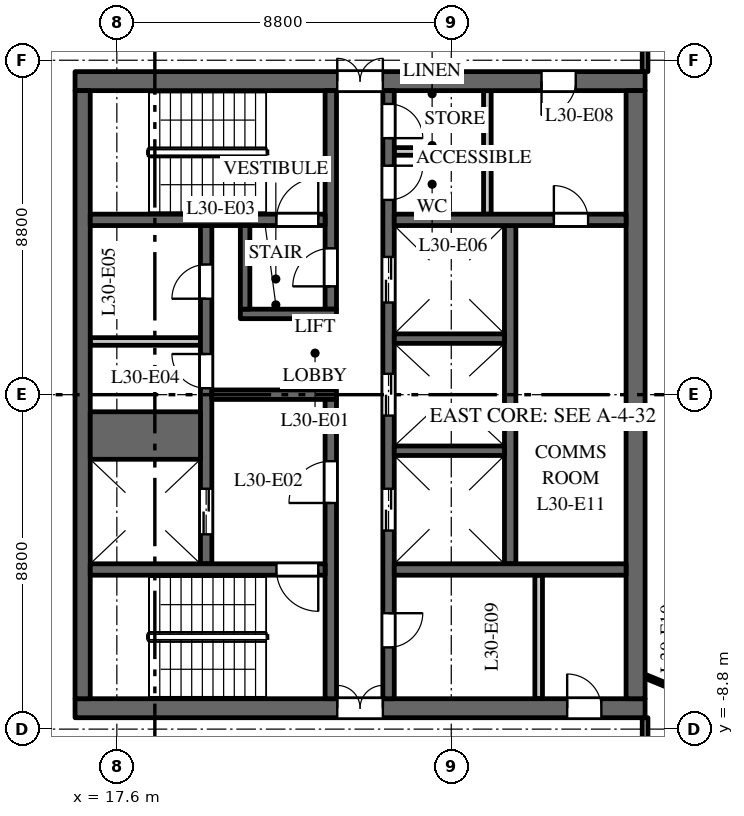
"""IFC4 building model, lengths in metres.
Left out: names, types, materials, properties, quantities, classifications, styles, units other than length and angle.
Written with IfcOpenShell. Run it as: python <this file> out.ifc"""

import sys

from ifc_helpers import new_model, si_unit, direction, frame, frame_2d, origin, place, context, subcontext, project, spatial, rectangle, extrude, element, fill, save


model = new_model("IFC4")
c1 = context("Model", 3, precision=1e-05, world=origin(), true_north=direction((0.0, 1.0)))
c2 = subcontext(c1, "Body", "Model", "MODEL_VIEW")
j1 = project(units=[si_unit("LENGTHUNIT", "METRE"), si_unit("PLANEANGLEUNIT", "RADIAN")], contexts=[c1])
p1 = place(None, origin())
s1 = spatial("IfcSite", under=j1, at=p1, CompositionType="ELEMENT")
p2 = place(p1, origin())
s2 = spatial("IfcBuilding", under=s1, at=p2, CompositionType="ELEMENT")
p3 = place(p2, frame((0.0, 0.0, 132.0)))
s3 = spatial("IfcBuildingStorey", under=s2, at=p3, CompositionType="ELEMENT", Elevation=132.0)
p4 = place(p3, frame((16.5, 8.25, 0.0), z_axis=(0.0, 0.0, 1.0), x_axis=(1.0, 0.0, 0.0)))
e1 = element("IfcWall", 1, at=p4, inside=s3, PredefinedType="SHEAR", context=c2, shape_type="SweptSolid", body=[
    extrude(rectangle(XDim=15.0, YDim=0.5, at=frame_2d((7.5, 0.0))), origin(), (0.0, 0.0, 1.0), 3.7),
])
p5 = place(p4, frame((6.9, 0.0, 0.0)))
e2 = element("IfcOpeningElement", 2, at=p5, cuts=e1, PredefinedType="OPENING", context=c2, shape_type="SweptSolid", body=[
    extrude(rectangle(XDim=1.2, YDim=2.1, at=frame_2d((0.6, 1.05))), frame((0.0, 0.26, 0.0), z_axis=(0.0, -1.0, 0.0), x_axis=(1.0, 0.0, 0.0)), (0.0, 0.0, 1.0), 0.52),
])
p6 = place(p4, frame((12.275, 0.0, 0.0)))
e3 = element("IfcOpeningElement", 3, at=p6, cuts=e1, PredefinedType="OPENING", context=c2, shape_type="SweptSolid", body=[
    extrude(rectangle(XDim=0.9, YDim=2.1, at=frame_2d((0.45, 1.05))), frame((0.0, 0.26, 0.0), z_axis=(0.0, -1.0, 0.0), x_axis=(1.0, 0.0, 0.0)), (0.0, 0.0, 1.0), 0.52),
])
p7 = place(p3, frame((16.5, -8.25, 0.0), z_axis=(0.0, 0.0, 1.0), x_axis=(1.0, 0.0, 0.0)))
e4 = element("IfcWall", 4, at=p7, inside=s3, PredefinedType="SHEAR", context=c2, shape_type="SweptSolid", body=[
    extrude(rectangle(XDim=15.0, YDim=0.5, at=frame_2d((7.5, 0.0))), origin(), (0.0, 0.0, 1.0), 3.7),
])
p8 = place(p7, frame((6.9, 0.0, 0.0)))
e5 = element("IfcOpeningElement", 5, at=p8, cuts=e4, PredefinedType="OPENING", context=c2, shape_type="SweptSolid", body=[
    extrude(rectangle(XDim=1.2, YDim=2.1, at=frame_2d((0.6, 1.05))), frame((0.0, 0.26, 0.0), z_axis=(0.0, -1.0, 0.0), x_axis=(1.0, 0.0, 0.0)), (0.0, 0.0, 1.0), 0.52),
])
p9 = place(p7, frame((12.95, 0.0, 0.0)))
e6 = element("IfcOpeningElement", 6, at=p9, cuts=e4, PredefinedType="OPENING", context=c2, shape_type="SweptSolid", body=[
    extrude(rectangle(XDim=0.9, YDim=2.1, at=frame_2d((0.45, 1.05))), frame((0.0, 0.26, 0.0), z_axis=(0.0, -1.0, 0.0), x_axis=(1.0, 0.0, 0.0)), (0.0, 0.0, 1.0), 0.52),
])
p10 = place(p3, frame((16.9, 1.4, 0.0), z_axis=(0.0, 0.0, 1.0), x_axis=(1.0, 0.0, 0.0)))
e7 = element("IfcWall", 7, at=p10, inside=s3, PredefinedType="PARTITIONING", context=c2, shape_type="SweptSolid", body=[
    extrude(rectangle(XDim=2.9, YDim=0.2, at=frame_2d((1.45, 0.0))), origin(), (0.0, 0.0, 1.0), 3.7),
])
p11 = place(p3, frame((27.95, -4.45, 0.0), z_axis=(0.0, 0.0, 1.0), x_axis=(0.0, 1.0, 0.0)))
e8 = element("IfcWall", 8, at=p11, inside=s3, PredefinedType="SHEAR", context=c2, shape_type="SweptSolid", body=[
    extrude(rectangle(XDim=8.9, YDim=0.3, at=frame_2d((4.45, 0.0))), origin(), (0.0, 0.0, 1.0), 3.7),
])
p12 = place(p3, frame((19.95, -4.45, 0.0), z_axis=(0.0, 0.0, 1.0), x_axis=(0.0, 1.0, 0.0)))
e9 = element("IfcWall", 9, at=p12, inside=s3, PredefinedType="SHEAR", context=c2, shape_type="SweptSolid", body=[
    extrude(rectangle(XDim=8.9, YDim=0.3, at=frame_2d((4.45, 0.0))), origin(), (0.0, 0.0, 1.0), 3.7),
])
p13 = place(p12, frame((0.775, 0.0, 0.0)))
e10 = element("IfcOpeningElement", 10, at=p13, cuts=e9, PredefinedType="OPENING", context=c2, shape_type="SweptSolid", body=[
    extrude(rectangle(XDim=1.2, YDim=2.1, at=frame_2d((0.6, 1.05))), frame((0.0, 0.16, 0.0), z_axis=(0.0, -1.0, 0.0), x_axis=(1.0, 0.0, 0.0)), (0.0, 0.0, 1.0), 0.32),
])
p14 = place(p12, frame((4.62, 0.0, 0.0)))
e11 = element("IfcOpeningElement", 11, at=p14, cuts=e9, PredefinedType="OPENING", context=c2, shape_type="SweptSolid", body=[
    extrude(rectangle(XDim=0.9, YDim=2.1, at=frame_2d((0.45, 1.05))), frame((0.0, 0.16, 0.0), z_axis=(0.0, -1.0, 0.0), x_axis=(1.0, 0.0, 0.0)), (0.0, 0.0, 1.0), 0.32),
])
p15 = place(p12, frame((6.975, 0.0, 0.0)))
e12 = element("IfcOpeningElement", 12, at=p15, cuts=e9, PredefinedType="OPENING", context=c2, shape_type="SweptSolid", body=[
    extrude(rectangle(XDim=0.9, YDim=2.1, at=frame_2d((0.45, 1.05))), frame((0.0, 0.16, 0.0), z_axis=(0.0, -1.0, 0.0), x_axis=(1.0, 0.0, 0.0)), (0.0, 0.0, 1.0), 0.32),
])
p16 = place(p3, frame((24.75, -8.0, 0.0), z_axis=(0.0, 0.0, 1.0), x_axis=(0.0, 1.0, 0.0)))
e13 = element("IfcWall", 13, at=p16, inside=s3, PredefinedType="SHEAR", context=c2, shape_type="SweptSolid", body=[
    extrude(rectangle(XDim=16.0, YDim=0.3, at=frame_2d((8.0, 0.0))), origin(), (0.0, 0.0, 1.0), 3.7),
])
p17 = place(p16, frame((4.425, 0.0, 0.0)))
e14 = element("IfcOpeningElement", 14, at=p17, cuts=e13, PredefinedType="OPENING", context=c2, shape_type="SweptSolid", body=[
    extrude(rectangle(XDim=1.1, YDim=2.1, at=frame_2d((0.55, 1.05))), frame((0.0, 0.16, 0.0), z_axis=(0.0, -1.0, 0.0), x_axis=(1.0, 0.0, 0.0)), (0.0, 0.0, 1.0), 0.32),
])
p18 = place(p16, frame((7.45, 0.0, 0.0)))
e15 = element("IfcOpeningElement", 15, at=p18, cuts=e13, PredefinedType="OPENING", context=c2, shape_type="SweptSolid", body=[
    extrude(rectangle(XDim=1.1, YDim=2.1, at=frame_2d((0.55, 1.05))), frame((0.0, 0.16, 0.0), z_axis=(0.0, -1.0, 0.0), x_axis=(1.0, 0.0, 0.0)), (0.0, 0.0, 1.0), 0.32),
])
p19 = place(p16, frame((10.425, 0.0, 0.0)))
e16 = element("IfcOpeningElement", 16, at=p19, cuts=e13, PredefinedType="OPENING", context=c2, shape_type="SweptSolid", body=[
    extrude(rectangle(XDim=1.2, YDim=2.1, at=frame_2d((0.6, 1.05))), frame((0.0, 0.16, 0.0), z_axis=(0.0, -1.0, 0.0), x_axis=(1.0, 0.0, 0.0)), (0.0, 0.0, 1.0), 0.32),
])
p20 = place(p16, frame((13.125, 0.0, 0.0)))
e17 = element("IfcOpeningElement", 17, at=p20, cuts=e13, PredefinedType="OPENING", context=c2, shape_type="SweptSolid", body=[
    extrude(rectangle(XDim=0.9, YDim=2.1, at=frame_2d((0.45, 1.05))), frame((0.0, 0.16, 0.0), z_axis=(0.0, -1.0, 0.0), x_axis=(1.0, 0.0, 0.0)), (0.0, 0.0, 1.0), 0.32),
])
p21 = place(p16, frame((14.75, 0.0, 0.0)))
e18 = element("IfcOpeningElement", 18, at=p21, cuts=e13, PredefinedType="OPENING", context=c2, shape_type="SweptSolid", body=[
    extrude(rectangle(XDim=0.9, YDim=2.1, at=frame_2d((0.45, 1.05))), frame((0.0, 0.16, 0.0), z_axis=(0.0, -1.0, 0.0), x_axis=(1.0, 0.0, 0.0)), (0.0, 0.0, 1.0), 0.32),
])
p22 = place(p16, frame((1.35, 0.0, 0.0)))
e19 = element("IfcOpeningElement", 19, at=p22, cuts=e13, PredefinedType="OPENING", context=c2, shape_type="SweptSolid", body=[
    extrude(rectangle(XDim=0.9, YDim=2.1, at=frame_2d((0.45, 1.05))), frame((0.0, 0.16, 0.0), z_axis=(0.0, -1.0, 0.0), x_axis=(1.0, 0.0, 0.0)), (0.0, 0.0, 1.0), 0.32),
])
p23 = place(p3, frame((20.1, 0.0, 0.0), z_axis=(0.0, 0.0, 1.0), x_axis=(1.0, 0.0, 0.0)))
e20 = element("IfcWall", 20, at=p23, inside=s3, PredefinedType="SHEAR", context=c2, shape_type="SweptSolid", body=[
    extrude(rectangle(XDim=3.28, YDim=0.25, at=frame_2d((1.64, 0.0))), origin(), (0.0, 0.0, 1.0), 3.7),
])
p24 = place(p3, frame((16.7, -8.0, 0.0), z_axis=(0.0, 0.0, 1.0), x_axis=(0.0, 1.0, 0.0)))
e21 = element("IfcWall", 21, at=p24, inside=s3, PredefinedType="SHEAR", context=c2, shape_type="SweptSolid", body=[
    extrude(rectangle(XDim=16.0, YDim=0.4, at=frame_2d((8.0, 0.0))), origin(), (0.0, 0.0, 1.0), 3.7),
])
p25 = place(p3, frame((31.25, -8.0, 0.0), z_axis=(0.0, 0.0, 1.0), x_axis=(0.0, 1.0, 0.0)))
e22 = element("IfcWall", 22, at=p25, inside=s3, PredefinedType="SHEAR", context=c2, shape_type="SweptSolid", body=[
    extrude(rectangle(XDim=16.0, YDim=0.5, at=frame_2d((8.0, 0.0))), origin(), (0.0, 0.0, 1.0), 3.7),
])
p26 = place(p3, frame((24.9, 4.6, 0.0), z_axis=(0.0, 0.0, 1.0), x_axis=(1.0, 0.0, 0.0)))
e23 = element("IfcWall", 23, at=p26, inside=s3, PredefinedType="SHEAR", context=c2, shape_type="SweptSolid", body=[
    extrude(rectangle(XDim=6.1, YDim=0.3, at=frame_2d((3.05, 0.0))), origin(), (0.0, 0.0, 1.0), 3.7),
])
p27 = place(p26, frame((4.2, 0.0, 0.0)))
e24 = element("IfcOpeningElement", 24, at=p27, cuts=e23, PredefinedType="OPENING", context=c2, shape_type="SweptSolid", body=[
    extrude(rectangle(XDim=0.9, YDim=2.1, at=frame_2d((0.45, 1.05))), frame((0.0, 0.16, 0.0), z_axis=(0.0, -1.0, 0.0), x_axis=(1.0, 0.0, 0.0)), (0.0, 0.0, 1.0), 0.32),
])
for number, where, z_axis, x_axis in (
    (25, (27.35, 4.75, 0.0), (0.0, 0.0, 1.0), (0.0, 1.0, 0.0)),
    (26, (28.7, -8.0, 0.0), (0.0, 0.0, 1.0), (0.0, 1.0, 0.0)),
):
    element("IfcWall", number, at=place(p3, frame(where, z_axis=z_axis, x_axis=x_axis)), inside=s3, PredefinedType="PARTITIONING", context=c2, shape_type="SweptSolid", body=[
        extrude(rectangle(XDim=3.25, YDim=0.2, at=frame_2d((1.625, 0.0))), origin(), (0.0, 0.0, 1.0), 3.7),
    ])
p28 = place(p3, frame((24.9, 6.4, 0.0), z_axis=(0.0, 0.0, 1.0), x_axis=(1.0, 0.0, 0.0)))
e27 = element("IfcWall", 27, at=p28, inside=s3, PredefinedType="PARTITIONING", context=c2, shape_type="SweptSolid", body=[
    extrude(rectangle(XDim=2.35, YDim=0.2, at=frame_2d((1.175, 0.0))), origin(), (0.0, 0.0, 1.0), 3.7),
])
p29 = place(p3, frame((24.9, -4.6, 0.0), z_axis=(0.0, 0.0, 1.0), x_axis=(1.0, 0.0, 0.0)))
e28 = element("IfcWall", 28, at=p29, inside=s3, PredefinedType="SHEAR", context=c2, shape_type="SweptSolid", body=[
    extrude(rectangle(XDim=6.1, YDim=0.3, at=frame_2d((3.05, 0.0))), origin(), (0.0, 0.0, 1.0), 3.7),
])
p30 = place(p3, frame((16.9, -1.075, 0.0), z_axis=(0.0, 0.0, 1.0), x_axis=(1.0, 0.0, 0.0)))
e29 = element("IfcWall", 29, at=p30, inside=s3, PredefinedType="SHEAR", context=c2, shape_type="SweptSolid", body=[
    extrude(rectangle(XDim=2.9, YDim=1.25, at=frame_2d((1.45, 0.0))), origin(), (0.0, 0.0, 1.0), 3.7),
])
for number, where, z_axis, x_axis in (
    (30, (24.9, -1.475, 0.0), (0.0, 0.0, 1.0), (1.0, 0.0, 0.0)),
    (31, (24.9, 1.475, 0.0), (0.0, 0.0, 1.0), (1.0, 0.0, 0.0)),
):
    element("IfcWall", number, at=place(p3, frame(where, z_axis=z_axis, x_axis=x_axis)), inside=s3, PredefinedType="SHEAR", context=c2, shape_type="SweptSolid", body=[
        extrude(rectangle(XDim=2.9, YDim=0.25, at=frame_2d((1.45, 0.0))), origin(), (0.0, 0.0, 1.0), 3.7),
    ])
p31 = place(p3, frame((23.23, 2.25, 0.0), z_axis=(0.0, 0.0, 1.0), x_axis=(0.0, 1.0, 0.0)))
e32 = element("IfcWall", 32, at=p31, inside=s3, PredefinedType="SHEAR", context=c2, shape_type="SweptSolid", body=[
    extrude(rectangle(XDim=5.75, YDim=0.3, at=frame_2d((2.875, 0.0))), origin(), (0.0, 0.0, 1.0), 3.7),
])
p32 = place(p31, frame((0.6, 0.0, 0.0)))
e33 = element("IfcOpeningElement", 33, at=p32, cuts=e32, PredefinedType="OPENING", context=c2, shape_type="SweptSolid", body=[
    extrude(rectangle(XDim=1.0, YDim=2.1, at=frame_2d((0.5, 1.05))), frame((0.0, 0.16, 0.0), z_axis=(0.0, -1.0, 0.0), x_axis=(1.0, 0.0, 0.0)), (0.0, 0.0, 1.0), 0.32),
])
p33 = place(p3, frame((23.23, -8.0, 0.0), z_axis=(0.0, 0.0, 1.0), x_axis=(0.0, 1.0, 0.0)))
e34 = element("IfcWall", 34, at=p33, inside=s3, PredefinedType="SHEAR", context=c2, shape_type="SweptSolid", body=[
    extrude(rectangle(XDim=7.875, YDim=0.3, at=frame_2d((3.938, 0.0))), origin(), (0.0, 0.0, 1.0), 3.7),
])
p34 = place(p33, frame((5.15, 0.0, 0.0)))
e35 = element("IfcOpeningElement", 35, at=p34, cuts=e34, PredefinedType="OPENING", context=c2, shape_type="SweptSolid", body=[
    extrude(rectangle(XDim=1.1, YDim=2.1, at=frame_2d((0.55, 1.05))), frame((0.0, 0.16, 0.0), z_axis=(0.0, -1.0, 0.0), x_axis=(1.0, 0.0, 0.0)), (0.0, 0.0, 1.0), 0.32),
])
p35 = place(p3, frame((16.9, 4.6, 0.0), z_axis=(0.0, 0.0, 1.0), x_axis=(1.0, 0.0, 0.0)))
e36 = element("IfcWall", 36, at=p35, inside=s3, PredefinedType="SHEAR", context=c2, shape_type="SweptSolid", body=[
    extrude(rectangle(XDim=6.18, YDim=0.3, at=frame_2d((3.09, 0.0))), origin(), (0.0, 0.0, 1.0), 3.7),
])
p36 = place(p35, frame((4.9, 0.0, 0.0)))
e37 = element("IfcOpeningElement", 37, at=p36, cuts=e36, PredefinedType="OPENING", context=c2, shape_type="SweptSolid", body=[
    extrude(rectangle(XDim=1.1, YDim=2.1, at=frame_2d((0.55, 1.05))), frame((0.0, 0.16, 0.0), z_axis=(0.0, -1.0, 0.0), x_axis=(1.0, 0.0, 0.0)), (0.0, 0.0, 1.0), 0.32),
])
p37 = place(p3, frame((16.9, -4.6, 0.0), z_axis=(0.0, 0.0, 1.0), x_axis=(1.0, 0.0, 0.0)))
e38 = element("IfcWall", 38, at=p37, inside=s3, PredefinedType="SHEAR", context=c2, shape_type="SweptSolid", body=[
    extrude(rectangle(XDim=6.18, YDim=0.3, at=frame_2d((3.09, 0.0))), origin(), (0.0, 0.0, 1.0), 3.7),
])
p38 = place(p37, frame((4.9, 0.0, 0.0)))
e39 = element("IfcOpeningElement", 39, at=p38, cuts=e38, PredefinedType="OPENING", context=c2, shape_type="SweptSolid", body=[
    extrude(rectangle(XDim=1.1, YDim=2.1, at=frame_2d((0.55, 1.05))), frame((0.0, 0.16, 0.0), z_axis=(0.0, -1.0, 0.0), x_axis=(1.0, 0.0, 0.0)), (0.0, 0.0, 1.0), 0.32),
])
p39 = place(p3, frame((20.85, 2.125, 0.0), z_axis=(0.0, 0.0, 1.0), x_axis=(1.0, 0.0, 0.0)))
e40 = element("IfcWall", 40, at=p39, inside=s3, PredefinedType="SHEAR", context=c2, shape_type="SweptSolid", body=[
    extrude(rectangle(XDim=2.53, YDim=0.25, at=frame_2d((1.265, 0.0))), origin(), (0.0, 0.0, 1.0), 3.7),
])
p40 = place(p3, frame((20.975, 2.25, 0.0), z_axis=(0.0, 0.0, 1.0), x_axis=(0.0, 1.0, 0.0)))
e41 = element("IfcWall", 41, at=p40, inside=s3, PredefinedType="SHEAR", context=c2, shape_type="SweptSolid", body=[
    extrude(rectangle(XDim=2.2, YDim=0.25, at=frame_2d((1.1, 0.0))), origin(), (0.0, 0.0, 1.0), 3.7),
])
p41 = place(p3, frame((31.5, -10.7, 0.0), z_axis=(0.0, 0.0, 1.0), x_axis=(0.0, 1.0, 0.0)))
e42 = element("IfcWall", 42, at=p41, inside=s3, PredefinedType="PARTITIONING", context=c2, shape_type="SweptSolid", body=[
    extrude(rectangle(XDim=2.2, YDim=0.15, at=frame_2d((1.1, 0.0))), origin(), (0.0, 0.0, 1.0), 2.9),
])
p42 = place(p3, frame((31.5, -7.41, 0.0), z_axis=(0.0, 0.0, 1.0), x_axis=(0.925344112436, -0.379128307542, 0.0)))
e43 = element("IfcWall", 43, at=p42, inside=s3, PredefinedType="PARTITIONING", context=c2, shape_type="SweptSolid", body=[
    extrude(rectangle(XDim=2.954, YDim=0.1, at=frame_2d((1.477, 0.0))), origin(), (0.0, 0.0, 1.0), 3.7),
])
p43 = place(p3, frame((31.5, 8.5, 0.0), z_axis=(0.0, 0.0, 1.0), x_axis=(0.0, 1.0, 0.0)))
e44 = element("IfcWall", 44, at=p43, inside=s3, PredefinedType="PARTITIONING", context=c2, shape_type="SweptSolid", body=[
    extrude(rectangle(XDim=2.2, YDim=0.15, at=frame_2d((1.1, 0.0))), origin(), (0.0, 0.0, 1.0), 2.9),
])
p44 = place(p13, origin())
e45 = element("IfcDoor", 45, at=p44, inside=s3, OperationType="DOUBLE_DOOR_SLIDING", PredefinedType="DOOR", context=c2, shape_type="SweptSolid", body=[
    extrude(rectangle(XDim=1.2, YDim=2.1, at=frame_2d((0.6, 1.05))), frame((0.0, 0.025, 0.0), z_axis=(0.0, -1.0, 0.0), x_axis=(1.0, 0.0, 0.0)), (0.0, 0.0, 1.0), 0.05),
])
fill(e10, e45)
p45 = place(p17, origin())
e46 = element("IfcDoor", 46, at=p45, inside=s3, OperationType="DOUBLE_DOOR_SLIDING", PredefinedType="DOOR", context=c2, shape_type="SweptSolid", body=[
    extrude(rectangle(XDim=1.1, YDim=2.1, at=frame_2d((0.55, 1.05))), frame((0.0, 0.025, 0.0), z_axis=(0.0, -1.0, 0.0), x_axis=(1.0, 0.0, 0.0)), (0.0, 0.0, 1.0), 0.05),
])
fill(e14, e46)
p46 = place(p18, origin())
e47 = element("IfcDoor", 47, at=p46, inside=s3, OperationType="DOUBLE_DOOR_SLIDING", PredefinedType="DOOR", context=c2, shape_type="SweptSolid", body=[
    extrude(rectangle(XDim=1.1, YDim=2.1, at=frame_2d((0.55, 1.05))), frame((0.0, 0.025, 0.0), z_axis=(0.0, -1.0, 0.0), x_axis=(1.0, 0.0, 0.0)), (0.0, 0.0, 1.0), 0.05),
])
fill(e15, e47)
p47 = place(p19, origin())
e48 = element("IfcDoor", 48, at=p47, inside=s3, OperationType="DOUBLE_DOOR_SLIDING", PredefinedType="DOOR", context=c2, shape_type="SweptSolid", body=[
    extrude(rectangle(XDim=1.2, YDim=2.1, at=frame_2d((0.6, 1.05))), frame((0.0, 0.025, 0.0), z_axis=(0.0, -1.0, 0.0), x_axis=(1.0, 0.0, 0.0)), (0.0, 0.0, 1.0), 0.05),
])
fill(e16, e48)
p48 = place(p36, origin())
e49 = element("IfcDoor", 49, at=p48, inside=s3, OperationType="SINGLE_SWING_LEFT", PredefinedType="DOOR", context=c2, shape_type="SweptSolid", body=[
    extrude(rectangle(XDim=1.1, YDim=2.1, at=frame_2d((0.55, 1.05))), frame((0.0, 0.025, 0.0), z_axis=(0.0, -1.0, 0.0), x_axis=(1.0, 0.0, 0.0)), (0.0, 0.0, 1.0), 0.05),
])
fill(e37, e49)
p49 = place(p38, origin())
e50 = element("IfcDoor", 50, at=p49, inside=s3, OperationType="SINGLE_SWING_RIGHT", PredefinedType="DOOR", context=c2, shape_type="SweptSolid", body=[
    extrude(rectangle(XDim=1.1, YDim=2.1, at=frame_2d((0.55, 1.05))), frame((0.0, 0.025, 0.0), z_axis=(0.0, -1.0, 0.0), x_axis=(1.0, 0.0, 0.0)), (0.0, 0.0, 1.0), 0.05),
])
fill(e39, e50)
p50 = place(p34, origin())
e51 = element("IfcDoor", 51, at=p50, inside=s3, OperationType="SINGLE_SWING_RIGHT", PredefinedType="DOOR", context=c2, shape_type="SweptSolid", body=[
    extrude(rectangle(XDim=1.1, YDim=2.1, at=frame_2d((0.55, 1.05))), frame((0.0, 0.025, 0.0), z_axis=(0.0, -1.0, 0.0), x_axis=(1.0, 0.0, 0.0)), (0.0, 0.0, 1.0), 0.05),
])
fill(e35, e51)
p51 = place(p32, origin())
e52 = element("IfcDoor", 52, at=p51, inside=s3, OperationType="SINGLE_SWING_RIGHT", PredefinedType="DOOR", context=c2, shape_type="SweptSolid", body=[
    extrude(rectangle(XDim=1.0, YDim=2.1, at=frame_2d((0.5, 1.05))), frame((0.0, 0.025, 0.0), z_axis=(0.0, -1.0, 0.0), x_axis=(1.0, 0.0, 0.0)), (0.0, 0.0, 1.0), 0.05),
])
fill(e33, e52)
p52 = place(p5, origin())
e53 = element("IfcDoor", 53, at=p52, inside=s3, OperationType="DOUBLE_DOOR_DOUBLE_SWING", PredefinedType="DOOR", context=c2, shape_type="SweptSolid", body=[
    extrude(rectangle(XDim=1.2, YDim=2.1, at=frame_2d((0.6, 1.05))), frame((0.0, 0.025, 0.0), z_axis=(0.0, -1.0, 0.0), x_axis=(1.0, 0.0, 0.0)), (0.0, 0.0, 1.0), 0.05),
])
fill(e2, e53)
p53 = place(p8, origin())
e54 = element("IfcDoor", 54, at=p53, inside=s3, OperationType="DOUBLE_DOOR_DOUBLE_SWING", PredefinedType="DOOR", context=c2, shape_type="SweptSolid", body=[
    extrude(rectangle(XDim=1.2, YDim=2.1, at=frame_2d((0.6, 1.05))), frame((0.0, 0.025, 0.0), z_axis=(0.0, -1.0, 0.0), x_axis=(1.0, 0.0, 0.0)), (0.0, 0.0, 1.0), 0.05),
])
fill(e5, e54)
p54 = place(p14, origin())
e55 = element("IfcDoor", 55, at=p54, inside=s3, OperationType="SINGLE_SWING_LEFT", PredefinedType="DOOR", context=c2, shape_type="SweptSolid", body=[
    extrude(rectangle(XDim=0.9, YDim=2.1, at=frame_2d((0.45, 1.05))), frame((0.0, 0.025, 0.0), z_axis=(0.0, -1.0, 0.0), x_axis=(1.0, 0.0, 0.0)), (0.0, 0.0, 1.0), 0.05),
])
fill(e11, e55)
p55 = place(p15, origin())
e56 = element("IfcDoor", 56, at=p55, inside=s3, OperationType="SINGLE_SWING_RIGHT", PredefinedType="DOOR", context=c2, shape_type="SweptSolid", body=[
    extrude(rectangle(XDim=0.9, YDim=2.1, at=frame_2d((0.45, 1.05))), frame((0.0, 0.025, 0.0), z_axis=(0.0, -1.0, 0.0), x_axis=(1.0, 0.0, 0.0)), (0.0, 0.0, 1.0), 0.05),
])
fill(e12, e56)
p56 = place(p20, origin())
e57 = element("IfcDoor", 57, at=p56, inside=s3, OperationType="SINGLE_SWING_RIGHT", PredefinedType="DOOR", context=c2, shape_type="SweptSolid", body=[
    extrude(rectangle(XDim=0.9, YDim=2.1, at=frame_2d((0.45, 1.05))), frame((0.0, 0.025, 0.0), z_axis=(0.0, -1.0, 0.0), x_axis=(1.0, 0.0, 0.0)), (0.0, 0.0, 1.0), 0.05),
])
fill(e17, e57)
p57 = place(p21, origin())
e58 = element("IfcDoor", 58, at=p57, inside=s3, OperationType="SINGLE_SWING_LEFT", PredefinedType="DOOR", context=c2, shape_type="SweptSolid", body=[
    extrude(rectangle(XDim=0.9, YDim=2.1, at=frame_2d((0.45, 1.05))), frame((0.0, 0.025, 0.0), z_axis=(0.0, -1.0, 0.0), x_axis=(1.0, 0.0, 0.0)), (0.0, 0.0, 1.0), 0.05),
])
fill(e18, e58)
p58 = place(p6, origin())
e59 = element("IfcDoor", 59, at=p58, inside=s3, OperationType="SINGLE_SWING_LEFT", PredefinedType="DOOR", context=c2, shape_type="SweptSolid", body=[
    extrude(rectangle(XDim=0.9, YDim=2.1, at=frame_2d((0.45, 1.05))), frame((0.0, 0.025, 0.0), z_axis=(0.0, -1.0, 0.0), x_axis=(1.0, 0.0, 0.0)), (0.0, 0.0, 1.0), 0.05),
])
fill(e3, e59)
p59 = place(p22, origin())
e60 = element("IfcDoor", 60, at=p59, inside=s3, OperationType="SINGLE_SWING_RIGHT", PredefinedType="DOOR", context=c2, shape_type="SweptSolid", body=[
    extrude(rectangle(XDim=0.9, YDim=2.1, at=frame_2d((0.45, 1.05))), frame((0.0, 0.025, 0.0), z_axis=(0.0, -1.0, 0.0), x_axis=(1.0, 0.0, 0.0)), (0.0, 0.0, 1.0), 0.05),
])
fill(e19, e60)
p60 = place(p9, origin())
e61 = element("IfcDoor", 61, at=p60, inside=s3, OperationType="SINGLE_SWING_RIGHT", PredefinedType="DOOR", context=c2, shape_type="SweptSolid", body=[
    extrude(rectangle(XDim=0.9, YDim=2.1, at=frame_2d((0.45, 1.05))), frame((0.0, 0.025, 0.0), z_axis=(0.0, -1.0, 0.0), x_axis=(1.0, 0.0, 0.0)), (0.0, 0.0, 1.0), 0.05),
])
fill(e6, e61)
p61 = place(p27, origin())
e62 = element("IfcDoor", 62, at=p61, inside=s3, OperationType="SINGLE_SWING_RIGHT", PredefinedType="DOOR", context=c2, shape_type="SweptSolid", body=[
    extrude(rectangle(XDim=0.9, YDim=2.1, at=frame_2d((0.45, 1.05))), frame((0.0, 0.025, 0.0), z_axis=(0.0, -1.0, 0.0), x_axis=(1.0, 0.0, 0.0)), (0.0, 0.0, 1.0), 0.05),
])
fill(e24, e62)
save(model, sys.argv[1])
